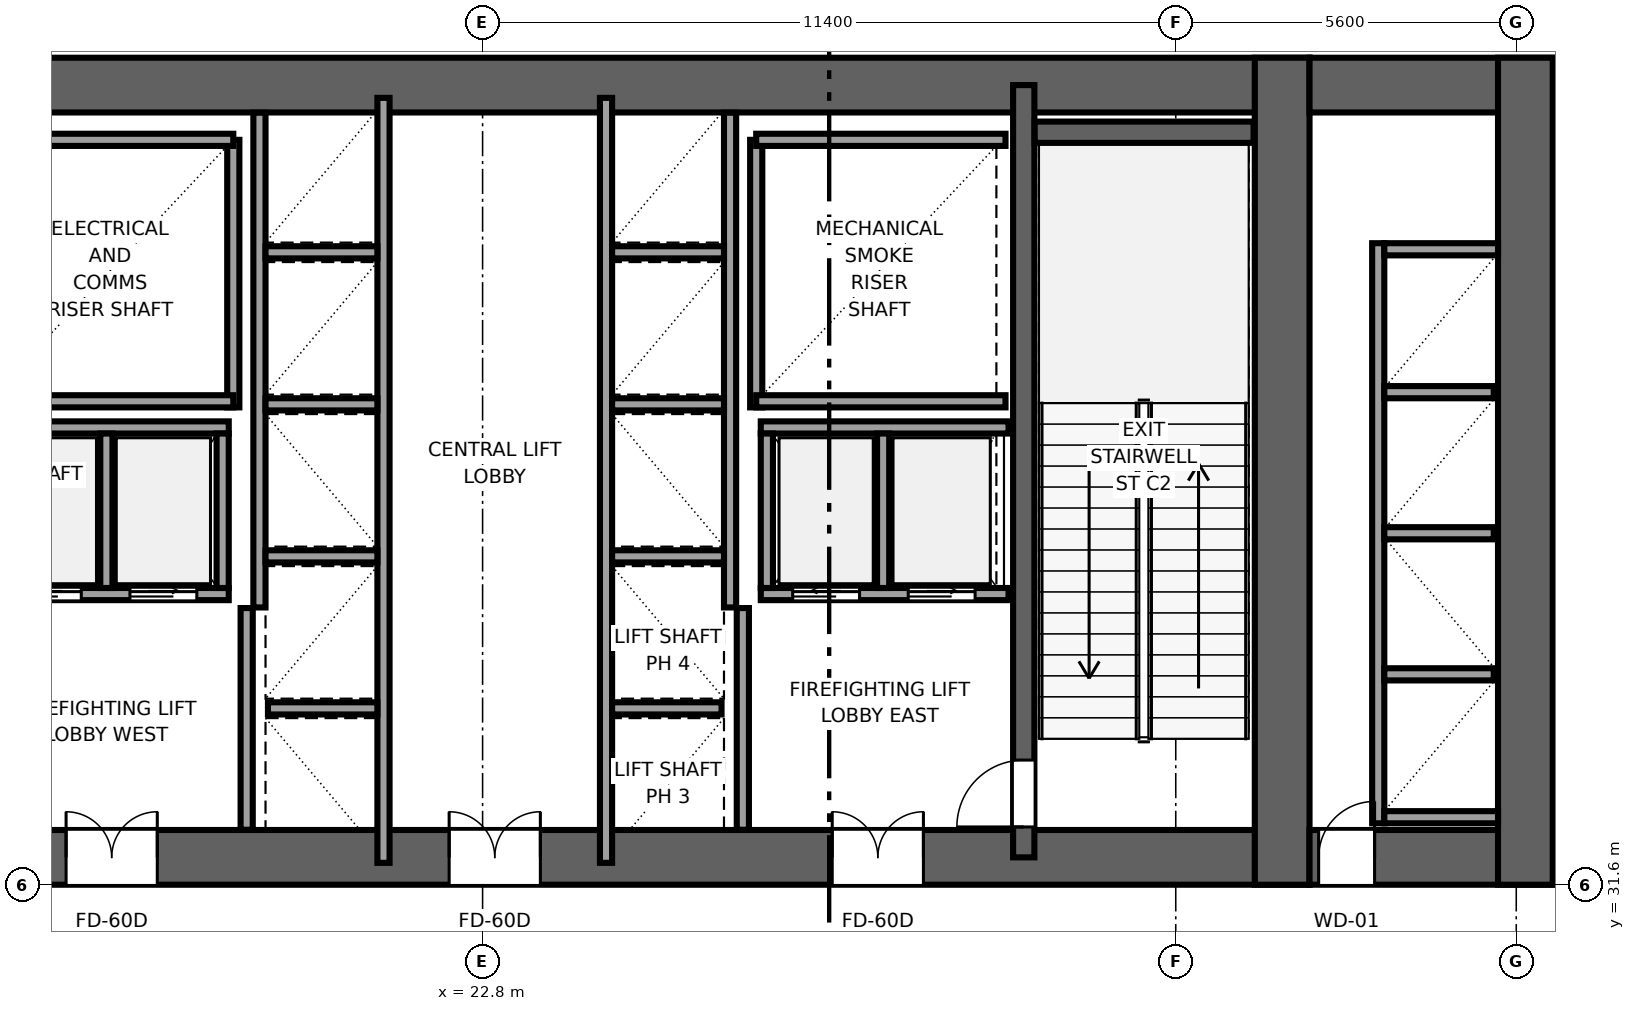
"""IFC4 building model, lengths in metres.
Left out: names, types, materials, properties, quantities, classifications, styles, units other than length and angle.
Written with IfcOpenShell. Run it as: python <this file> out.ifc"""

import sys

from ifc_helpers import new_model, si_unit, direction, frame, frame_2d, origin, place, context, subcontext, project, spatial, rectangle, extrude, source, transform, mapped, element, fill, save


model = new_model("IFC4")
c1 = context("Model", 3, precision=1e-05, world=origin(), true_north=direction((0.0, 1.0)))
c2 = subcontext(c1, "Body", "Model", "MODEL_VIEW")
j1 = project(units=[si_unit("LENGTHUNIT", "METRE"), si_unit("PLANEANGLEUNIT", "RADIAN")], contexts=[c1])
p1 = place(None, origin())
s1 = spatial("IfcSite", under=j1, at=p1, CompositionType="ELEMENT")
p2 = place(p1, origin())
s2 = spatial("IfcBuilding", under=s1, at=p2, CompositionType="ELEMENT")
p3 = place(p2, frame((0.0, 0.0, 16.0)))
s3 = spatial("IfcBuildingStorey", under=s2, at=p3, CompositionType="ELEMENT", Elevation=16.0)
p4 = place(p3, frame((9.6, 32.05, 0.0), z_axis=(0.0, 0.0, 1.0), x_axis=(1.0, 0.0, 0.0)))
e1 = element("IfcWall", 1, at=p4, inside=s3, PredefinedType="SHEAR", context=c2, shape_type="SweptSolid", body=[
    extrude(rectangle(XDim=26.8, YDim=0.9, at=frame_2d((13.4, 0.0))), origin(), (0.0, 0.0, 1.0), 6.4),
])
p5 = place(p4, frame((7.85, 0.0, 0.0), z_axis=(0.0, 0.0, 1.0), x_axis=(-1.0, 0.0, 0.0)))
e2 = element("IfcOpeningElement", 2, at=p5, cuts=e1, PredefinedType="OPENING", context=c2, shape_type="SweptSolid", body=[
    extrude(rectangle(XDim=1.5, YDim=2.04, at=frame_2d((0.75, 1.02))), frame((0.0, 0.46, 0.0), z_axis=(0.0, -1.0, 0.0), x_axis=(1.0, 0.0, 0.0)), (0.0, 0.0, 1.0), 0.92),
])
p6 = place(p4, frame((14.15, 0.0, 0.0), z_axis=(0.0, 0.0, 1.0), x_axis=(-1.0, 0.0, 0.0)))
e3 = element("IfcOpeningElement", 3, at=p6, cuts=e1, PredefinedType="OPENING", context=c2, shape_type="SweptSolid", body=[
    extrude(rectangle(XDim=1.5, YDim=2.04, at=frame_2d((0.75, 1.02))), frame((0.0, 0.46, 0.0), z_axis=(0.0, -1.0, 0.0), x_axis=(1.0, 0.0, 0.0)), (0.0, 0.0, 1.0), 0.92),
])
p7 = place(p4, frame((20.45, 0.0, 0.0), z_axis=(0.0, 0.0, 1.0), x_axis=(-1.0, 0.0, 0.0)))
e4 = element("IfcOpeningElement", 4, at=p7, cuts=e1, PredefinedType="OPENING", context=c2, shape_type="SweptSolid", body=[
    extrude(rectangle(XDim=1.5, YDim=2.04, at=frame_2d((0.75, 1.02))), frame((0.0, 0.46, 0.0), z_axis=(0.0, -1.0, 0.0), x_axis=(1.0, 0.0, 0.0)), (0.0, 0.0, 1.0), 0.92),
])
p8 = place(p3, frame((9.6, 44.75, 0.0), z_axis=(0.0, 0.0, 1.0), x_axis=(1.0, 0.0, 0.0)))
e5 = element("IfcWall", 5, at=p8, inside=s3, PredefinedType="SHEAR", context=c2, shape_type="SweptSolid", body=[
    extrude(rectangle(XDim=26.8, YDim=0.9, at=frame_2d((13.4, 0.0))), origin(), (0.0, 0.0, 1.0), 6.4),
])
p9 = place(p3, frame((35.95, 31.6, 0.0), z_axis=(0.0, 0.0, 1.0), x_axis=(0.0, 1.0, 0.0)))
e6 = element("IfcWall", 6, at=p9, inside=s3, PredefinedType="SHEAR", context=c2, shape_type="SweptSolid", body=[
    extrude(rectangle(XDim=13.6, YDim=0.9, at=frame_2d((6.8, 0.0))), origin(), (0.0, 0.0, 1.0), 6.4),
])
p10 = place(p3, frame((31.7, 32.05, 0.0), z_axis=(0.0, 0.0, 1.0), x_axis=(0.0, 1.0, 0.0)))
e7 = element("IfcWall", 7, at=p10, inside=s3, PredefinedType="SHEAR", context=c2, shape_type="SweptSolid", body=[
    extrude(rectangle(XDim=12.7, YDim=0.35, at=frame_2d((6.35, 0.0))), origin(), (0.0, 0.0, 1.0), 6.4),
])
p11 = place(p10, frame((1.6, 0.0, 0.0), z_axis=(0.0, 0.0, 1.0), x_axis=(-1.0, 0.0, 0.0)))
e8 = element("IfcOpeningElement", 8, at=p11, cuts=e7, PredefinedType="OPENING", context=c2, shape_type="SweptSolid", body=[
    extrude(rectangle(XDim=1.1, YDim=2.12, at=frame_2d((0.55, 1.06))), frame((0.0, 0.185, 0.0), z_axis=(0.0, -1.0, 0.0), x_axis=(1.0, 0.0, 0.0)), (0.0, 0.0, 1.0), 0.37),
])
p12 = place(p3, frame((36.4, 32.05, 0.0), z_axis=(0.0, 0.0, 1.0), x_axis=(1.0, 0.0, 0.0)))
e9 = element("IfcWall", 9, at=p12, inside=s3, PredefinedType="SHEAR", context=c2, shape_type="SweptSolid", body=[
    extrude(rectangle(XDim=4.0, YDim=0.9, at=frame_2d((2.0, 0.0))), origin(), (0.0, 0.0, 1.0), 6.4),
])
p13 = place(p12, frame((1.07, 0.0, 0.0), z_axis=(0.0, 0.0, 1.0), x_axis=(-1.0, 0.0, 0.0)))
e10 = element("IfcOpeningElement", 10, at=p13, cuts=e9, PredefinedType="OPENING", context=c2, shape_type="SweptSolid", body=[
    extrude(rectangle(XDim=0.92, YDim=2.01, at=frame_2d((0.46, 1.005))), frame((0.0, 0.46, 0.0), z_axis=(0.0, -1.0, 0.0), x_axis=(1.0, 0.0, 0.0)), (0.0, 0.0, 1.0), 0.92),
])
p14 = place(p3, frame((36.4, 44.75, 0.0), z_axis=(0.0, 0.0, 1.0), x_axis=(1.0, 0.0, 0.0)))
e11 = element("IfcWall", 11, at=p14, inside=s3, PredefinedType="SHEAR", context=c2, shape_type="SweptSolid", body=[
    extrude(rectangle(XDim=4.0, YDim=0.9, at=frame_2d((2.0, 0.0))), origin(), (0.0, 0.0, 1.0), 6.4),
])
p15 = place(p3, frame((39.95, 31.6, 0.0), z_axis=(0.0, 0.0, 1.0), x_axis=(0.0, 1.0, 0.0)))
e12 = element("IfcWall", 12, at=p15, inside=s3, PredefinedType="SHEAR", context=c2, shape_type="SweptSolid", body=[
    extrude(rectangle(XDim=13.6, YDim=0.9, at=frame_2d((6.8, 0.0))), origin(), (0.0, 0.0, 1.0), 6.4),
])
p16 = place(p3, frame((31.88, 43.975, 0.0), z_axis=(0.0, 0.0, 1.0), x_axis=(1.0, 0.0, 0.0)))
e13 = element("IfcWall", 13, at=p16, inside=s3, PredefinedType="SHEAR", context=c2, shape_type="SweptSolid", body=[
    extrude(rectangle(XDim=3.6, YDim=0.35, at=frame_2d((1.8, 0.0))), origin(), (0.0, 0.0, 1.0), 6.4),
])
p17 = place(p3, frame((18.7, 39.45, 0.0), z_axis=(0.0, 0.0, 1.0), x_axis=(0.0, 1.0, 0.0)))
e14 = element("IfcWall", 14, at=p17, inside=s3, PredefinedType="SOLIDWALL", context=c2, shape_type="SweptSolid", body=[
    extrude(rectangle(XDim=4.4, YDim=0.2, at=frame_2d((2.2, 0.0))), origin(), (0.0, 0.0, 1.0), 6.14),
])
for number, where, z_axis, x_axis in (
    (15, (14.6, 39.55, 0.0), (0.0, 0.0, 1.0), (1.0, 0.0, 0.0)),
    (16, (14.6, 43.85, 0.0), (0.0, 0.0, 1.0), (1.0, 0.0, 0.0)),
):
    element("IfcWall", number, at=place(p3, frame(where, z_axis=z_axis, x_axis=x_axis)), inside=s3, PredefinedType="SOLIDWALL", context=c2, shape_type="SweptSolid", body=[
        extrude(rectangle(XDim=4.1, YDim=0.2, at=frame_2d((2.05, 0.0))), origin(), (0.0, 0.0, 1.0), 6.14),
    ])
p18 = place(p3, frame((27.3, 39.45, 0.0), z_axis=(0.0, 0.0, 1.0), x_axis=(0.0, 1.0, 0.0)))
e17 = element("IfcWall", 17, at=p18, inside=s3, PredefinedType="SOLIDWALL", context=c2, shape_type="SweptSolid", body=[
    extrude(rectangle(XDim=4.4, YDim=0.2, at=frame_2d((2.2, 0.0))), origin(), (0.0, 0.0, 1.0), 6.14),
])
for number, where, z_axis, x_axis in (
    (18, (27.3, 39.55, 0.0), (0.0, 0.0, 1.0), (1.0, 0.0, 0.0)),
    (19, (27.3, 43.85, 0.0), (0.0, 0.0, 1.0), (1.0, 0.0, 0.0)),
):
    element("IfcWall", number, at=place(p3, frame(where, z_axis=z_axis, x_axis=x_axis)), inside=s3, PredefinedType="SOLIDWALL", context=c2, shape_type="SweptSolid", body=[
        extrude(rectangle(XDim=4.1, YDim=0.2, at=frame_2d((2.05, 0.0))), origin(), (0.0, 0.0, 1.0), 6.14),
    ])
for number, where, z_axis, x_axis in (
    (20, (18.92, 32.504, 0.0), (0.0, 0.0, 1.0), (0.0, 1.0, 0.0)),
    (21, (27.08, 32.504, 0.0), (0.0, 0.0, 1.0), (0.0, 1.0, 0.0)),
):
    element("IfcWall", number, at=place(p3, frame(where, z_axis=z_axis, x_axis=x_axis)), inside=s3, PredefinedType="SOLIDWALL", context=c2, shape_type="SweptSolid", body=[
        extrude(rectangle(XDim=3.646, YDim=0.2, at=frame_2d((1.823, 0.0))), origin(), (0.0, 0.0, 1.0), 6.14),
    ])
p19 = place(p3, frame((21.17, 31.96, 0.0), z_axis=(0.0, 0.0, 1.0), x_axis=(0.0, 1.0, 0.0)))
e22 = element("IfcWall", 22, at=p19, inside=s3, PredefinedType="SOLIDWALL", context=c2, shape_type="SweptSolid", body=[
    extrude(rectangle(XDim=12.58, YDim=0.2, at=frame_2d((6.29, 0.0))), origin(), (0.0, 0.0, 1.0), 6.14),
])
p20 = place(p3, frame((19.13, 36.16, 0.0), z_axis=(0.0, 0.0, 1.0), x_axis=(0.0, 1.0, 0.0)))
e23 = element("IfcWall", 23, at=p20, inside=s3, PredefinedType="SOLIDWALL", context=c2, shape_type="SweptSolid", body=[
    extrude(rectangle(XDim=8.136, YDim=0.2, at=frame_2d((4.068, 0.0))), origin(), (0.0, 0.0, 1.0), 6.14),
])
p21 = place(p3, frame((19.27, 34.5, 0.0), z_axis=(0.0, 0.0, 1.0), x_axis=(1.0, 0.0, 0.0)))
e24 = element("IfcWall", 24, at=p21, inside=s3, PredefinedType="SOLIDWALL", context=c2, shape_type="SweptSolid", body=[
    extrude(rectangle(XDim=1.8, YDim=0.2, at=frame_2d((0.9, 0.0))), origin(), (0.0, 0.0, 1.0), 6.14),
])
for number, where, z_axis, x_axis in (
    (25, (19.23, 37.0, 0.0), (0.0, 0.0, 1.0), (1.0, 0.0, 0.0)),
    (26, (19.23, 39.5, 0.0), (0.0, 0.0, 1.0), (1.0, 0.0, 0.0)),
    (27, (19.23, 42.0, 0.0), (0.0, 0.0, 1.0), (1.0, 0.0, 0.0)),
):
    element("IfcWall", number, at=place(p3, frame(where, z_axis=z_axis, x_axis=x_axis)), inside=s3, PredefinedType="SOLIDWALL", context=c2, shape_type="SweptSolid", body=[
        extrude(rectangle(XDim=1.84, YDim=0.2, at=frame_2d((0.92, 0.0))), origin(), (0.0, 0.0, 1.0), 6.14),
    ])
p22 = place(p3, frame((27.375, 36.38, 0.0), z_axis=(0.0, 0.0, 1.0), x_axis=(1.0, 0.0, 0.0)))
e28 = element("IfcWall", 28, at=p22, inside=s3, PredefinedType="SOLIDWALL", context=c2, shape_type="SweptSolid", body=[
    extrude(rectangle(XDim=4.075, YDim=0.2, at=frame_2d((2.038, 0.0))), origin(), (0.0, 0.0, 1.0), 6.14),
])
p23 = place(p22, frame((0.525, 0.0, 0.0)))
e29 = element("IfcOpeningElement", 29, at=p23, cuts=e28, PredefinedType="OPENING", context=c2, shape_type="SweptSolid", body=[
    extrude(rectangle(XDim=1.1, YDim=2.12, at=frame_2d((0.55, 1.06))), frame((0.0, 0.11, 0.0), z_axis=(0.0, -1.0, 0.0), x_axis=(1.0, 0.0, 0.0)), (0.0, 0.0, 1.0), 0.22),
])
p24 = place(p22, frame((2.425, 0.0, 0.0)))
e30 = element("IfcOpeningElement", 30, at=p24, cuts=e28, PredefinedType="OPENING", context=c2, shape_type="SweptSolid", body=[
    extrude(rectangle(XDim=1.1, YDim=2.12, at=frame_2d((0.55, 1.06))), frame((0.0, 0.11, 0.0), z_axis=(0.0, -1.0, 0.0), x_axis=(1.0, 0.0, 0.0)), (0.0, 0.0, 1.0), 0.22),
])
p25 = place(p3, frame((27.375, 39.12, 0.0), z_axis=(0.0, 0.0, 1.0), x_axis=(1.0, 0.0, 0.0)))
e31 = element("IfcWall", 31, at=p25, inside=s3, PredefinedType="SOLIDWALL", context=c2, shape_type="SweptSolid", body=[
    extrude(rectangle(XDim=4.075, YDim=0.2, at=frame_2d((2.038, 0.0))), origin(), (0.0, 0.0, 1.0), 6.14),
])
for number, where, z_axis, x_axis in (
    (32, (27.475, 36.48, 0.0), (0.0, 0.0, 1.0), (0.0, 1.0, 0.0)),
    (33, (29.387, 36.48, 0.0), (0.0, 0.0, 1.0), (0.0, 1.0, 0.0)),
):
    element("IfcWall", number, at=place(p3, frame(where, z_axis=z_axis, x_axis=x_axis)), inside=s3, PredefinedType="SOLIDWALL", context=c2, shape_type="SweptSolid", body=[
        extrude(rectangle(XDim=2.54, YDim=0.2, at=frame_2d((1.27, 0.0))), origin(), (0.0, 0.0, 1.0), 6.14),
    ])
p26 = place(p3, frame((14.55, 36.38, 0.0), z_axis=(0.0, 0.0, 1.0), x_axis=(1.0, 0.0, 0.0)))
e34 = element("IfcWall", 34, at=p26, inside=s3, PredefinedType="SOLIDWALL", context=c2, shape_type="SweptSolid", body=[
    extrude(rectangle(XDim=4.075, YDim=0.2, at=frame_2d((2.038, 0.0))), origin(), (0.0, 0.0, 1.0), 6.14),
])
p27 = place(p26, frame((0.55, 0.0, 0.0)))
e35 = element("IfcOpeningElement", 35, at=p27, cuts=e34, PredefinedType="OPENING", context=c2, shape_type="SweptSolid", body=[
    extrude(rectangle(XDim=1.1, YDim=2.12, at=frame_2d((0.55, 1.06))), frame((0.0, 0.11, 0.0), z_axis=(0.0, -1.0, 0.0), x_axis=(1.0, 0.0, 0.0)), (0.0, 0.0, 1.0), 0.22),
])
p28 = place(p26, frame((2.45, 0.0, 0.0)))
e36 = element("IfcOpeningElement", 36, at=p28, cuts=e34, PredefinedType="OPENING", context=c2, shape_type="SweptSolid", body=[
    extrude(rectangle(XDim=1.1, YDim=2.12, at=frame_2d((0.55, 1.06))), frame((0.0, 0.11, 0.0), z_axis=(0.0, -1.0, 0.0), x_axis=(1.0, 0.0, 0.0)), (0.0, 0.0, 1.0), 0.22),
])
p29 = place(p3, frame((14.55, 39.12, 0.0), z_axis=(0.0, 0.0, 1.0), x_axis=(1.0, 0.0, 0.0)))
e37 = element("IfcWall", 37, at=p29, inside=s3, PredefinedType="SOLIDWALL", context=c2, shape_type="SweptSolid", body=[
    extrude(rectangle(XDim=4.075, YDim=0.2, at=frame_2d((2.038, 0.0))), origin(), (0.0, 0.0, 1.0), 6.14),
])
for number, where, z_axis, x_axis in (
    (38, (18.525, 36.48, 0.0), (0.0, 0.0, 1.0), (0.0, 1.0, 0.0)),
    (39, (16.613, 36.48, 0.0), (0.0, 0.0, 1.0), (0.0, 1.0, 0.0)),
):
    element("IfcWall", number, at=place(p3, frame(where, z_axis=z_axis, x_axis=x_axis)), inside=s3, PredefinedType="SOLIDWALL", context=c2, shape_type="SweptSolid", body=[
        extrude(rectangle(XDim=2.54, YDim=0.2, at=frame_2d((1.27, 0.0))), origin(), (0.0, 0.0, 1.0), 6.14),
    ])
p30 = place(p3, frame((24.83, 31.96, 0.0), z_axis=(0.0, 0.0, 1.0), x_axis=(0.0, 1.0, 0.0)))
e40 = element("IfcWall", 40, at=p30, inside=s3, PredefinedType="SOLIDWALL", context=c2, shape_type="SweptSolid", body=[
    extrude(rectangle(XDim=12.58, YDim=0.2, at=frame_2d((6.29, 0.0))), origin(), (0.0, 0.0, 1.0), 6.14),
])
p31 = place(p3, frame((26.87, 36.16, 0.0), z_axis=(0.0, 0.0, 1.0), x_axis=(0.0, 1.0, 0.0)))
e41 = element("IfcWall", 41, at=p31, inside=s3, PredefinedType="SOLIDWALL", context=c2, shape_type="SweptSolid", body=[
    extrude(rectangle(XDim=8.136, YDim=0.2, at=frame_2d((4.068, 0.0))), origin(), (0.0, 0.0, 1.0), 6.14),
])
p32 = place(p3, frame((24.93, 34.5, 0.0), z_axis=(0.0, 0.0, 1.0), x_axis=(1.0, 0.0, 0.0)))
e42 = element("IfcWall", 42, at=p32, inside=s3, PredefinedType="SOLIDWALL", context=c2, shape_type="SweptSolid", body=[
    extrude(rectangle(XDim=1.8, YDim=0.2, at=frame_2d((0.9, 0.0))), origin(), (0.0, 0.0, 1.0), 6.14),
])
for number, where, z_axis, x_axis in (
    (43, (24.93, 37.0, 0.0), (0.0, 0.0, 1.0), (1.0, 0.0, 0.0)),
    (44, (24.93, 39.5, 0.0), (0.0, 0.0, 1.0), (1.0, 0.0, 0.0)),
    (45, (24.93, 42.0, 0.0), (0.0, 0.0, 1.0), (1.0, 0.0, 0.0)),
):
    element("IfcWall", number, at=place(p3, frame(where, z_axis=z_axis, x_axis=x_axis)), inside=s3, PredefinedType="SOLIDWALL", context=c2, shape_type="SweptSolid", body=[
        extrude(rectangle(XDim=1.84, YDim=0.2, at=frame_2d((0.92, 0.0))), origin(), (0.0, 0.0, 1.0), 6.14),
    ])
p33 = place(p3, frame((37.53, 32.61, 0.0), z_axis=(0.0, 0.0, 1.0), x_axis=(0.0, 1.0, 0.0)))
e46 = element("IfcWall", 46, at=p33, inside=s3, PredefinedType="SOLIDWALL", context=c2, shape_type="SweptSolid", body=[
    extrude(rectangle(XDim=9.54, YDim=0.2, at=frame_2d((4.77, 0.0))), origin(), (0.0, 0.0, 1.0), 6.14),
])
for number, where, z_axis, x_axis in (
    (47, (37.63, 32.71, 0.0), (0.0, 0.0, 1.0), (1.0, 0.0, 0.0)),
    (48, (37.63, 42.05, 0.0), (0.0, 0.0, 1.0), (1.0, 0.0, 0.0)),
):
    element("IfcWall", number, at=place(p3, frame(where, z_axis=z_axis, x_axis=x_axis)), inside=s3, PredefinedType="SOLIDWALL", context=c2, shape_type="SweptSolid", body=[
        extrude(rectangle(XDim=1.87, YDim=0.2, at=frame_2d((0.935, 0.0))), origin(), (0.0, 0.0, 1.0), 6.14),
    ])
for number, where, z_axis, x_axis in (
    (49, (37.63, 35.06, 0.0), (0.0, 0.0, 1.0), (1.0, 0.0, 0.0)),
    (50, (37.63, 37.38, 0.0), (0.0, 0.0, 1.0), (1.0, 0.0, 0.0)),
    (51, (37.63, 39.7, 0.0), (0.0, 0.0, 1.0), (1.0, 0.0, 0.0)),
):
    element("IfcWall", number, at=place(p3, frame(where, z_axis=z_axis, x_axis=x_axis)), inside=s3, PredefinedType="SOLIDWALL", context=c2, shape_type="SweptSolid", body=[
        extrude(rectangle(XDim=1.8, YDim=0.2, at=frame_2d((0.9, 0.0))), origin(), (0.0, 0.0, 1.0), 6.14),
    ])
m1 = source(origin(), c2, "Body", "SweptSolid", [
    extrude(rectangle(XDim=1.1, YDim=2.12, at=frame_2d((0.55, 1.06))), frame((0.0, 0.025, 0.0), z_axis=(0.0, -1.0, 0.0), x_axis=(1.0, 0.0, 0.0)), (0.0, 0.0, 1.0), 0.05),
])
p34 = place(p11, origin())
e52 = element("IfcDoor", 52, at=p34, inside=s3, OperationType="SINGLE_SWING_LEFT", PredefinedType="DOOR", context=c2, shape_type="MappedRepresentation", body=[
    mapped(m1, transform((0.0, 0.0, 0.0), x_axis=(1.0, 0.0, 0.0), y_axis=(0.0, 1.0, 0.0), z_axis=(0.0, 0.0, 1.0), scale=1.0)),
])
fill(e8, e52)
m2 = source(origin(), c2, "Body", "SweptSolid", [
    extrude(rectangle(XDim=1.5, YDim=2.04, at=frame_2d((0.75, 1.02))), frame((0.0, 0.025, 0.0), z_axis=(0.0, -1.0, 0.0), x_axis=(1.0, 0.0, 0.0)), (0.0, 0.0, 1.0), 0.05),
])
p35 = place(p5, origin())
e53 = element("IfcDoor", 53, at=p35, inside=s3, OperationType="DOUBLE_DOOR_SINGLE_SWING", PredefinedType="DOOR", context=c2, shape_type="MappedRepresentation", body=[
    mapped(m2, transform((0.0, 0.0, 0.0), x_axis=(1.0, 0.0, 0.0), y_axis=(0.0, 1.0, 0.0), z_axis=(0.0, 0.0, 1.0), scale=1.0)),
])
fill(e2, e53)
p36 = place(p6, origin())
e54 = element("IfcDoor", 54, at=p36, inside=s3, OperationType="DOUBLE_DOOR_SINGLE_SWING", PredefinedType="DOOR", context=c2, shape_type="MappedRepresentation", body=[
    mapped(m2, transform((0.0, 0.0, 0.0), x_axis=(1.0, 0.0, 0.0), y_axis=(0.0, 1.0, 0.0), z_axis=(0.0, 0.0, 1.0), scale=1.0)),
])
fill(e3, e54)
p37 = place(p7, origin())
e55 = element("IfcDoor", 55, at=p37, inside=s3, OperationType="DOUBLE_DOOR_SINGLE_SWING", PredefinedType="DOOR", context=c2, shape_type="MappedRepresentation", body=[
    mapped(m2, transform((0.0, 0.0, 0.0), x_axis=(1.0, 0.0, 0.0), y_axis=(0.0, 1.0, 0.0), z_axis=(0.0, 0.0, 1.0), scale=1.0)),
])
fill(e4, e55)
m3 = source(origin(), c2, "Body", "SweptSolid", [
    extrude(rectangle(XDim=0.92, YDim=2.01, at=frame_2d((0.46, 1.005))), frame((0.0, 0.025, 0.0), z_axis=(0.0, -1.0, 0.0), x_axis=(1.0, 0.0, 0.0)), (0.0, 0.0, 1.0), 0.05),
])
p38 = place(p13, origin())
e56 = element("IfcDoor", 56, at=p38, inside=s3, OperationType="SINGLE_SWING_RIGHT", PredefinedType="DOOR", context=c2, shape_type="MappedRepresentation", body=[
    mapped(m3, transform((0.0, 0.0, 0.0), x_axis=(1.0, 0.0, 0.0), y_axis=(0.0, 1.0, 0.0), z_axis=(0.0, 0.0, 1.0), scale=1.0)),
])
fill(e10, e56)
m4 = source(origin(), c2, "Body", "SweptSolid", [
    extrude(rectangle(XDim=1.1, YDim=2.12, at=frame_2d((0.55, 1.06))), frame((0.0, 0.025, 0.0), z_axis=(0.0, -1.0, 0.0), x_axis=(1.0, 0.0, 0.0)), (0.0, 0.0, 1.0), 0.05),
])
p39 = place(p23, origin())
e57 = element("IfcDoor", 57, at=p39, inside=s3, OperationType="SLIDING_TO_LEFT", PredefinedType="DOOR", context=c2, shape_type="MappedRepresentation", body=[
    mapped(m4, transform((0.0, 0.0, 0.0), x_axis=(1.0, 0.0, 0.0), y_axis=(0.0, 1.0, 0.0), z_axis=(0.0, 0.0, 1.0), scale=1.0)),
])
fill(e29, e57)
p40 = place(p24, origin())
e58 = element("IfcDoor", 58, at=p40, inside=s3, OperationType="SLIDING_TO_RIGHT", PredefinedType="DOOR", context=c2, shape_type="MappedRepresentation", body=[
    mapped(m4, transform((0.0, 0.0, 0.0), x_axis=(1.0, 0.0, 0.0), y_axis=(0.0, 1.0, 0.0), z_axis=(0.0, 0.0, 1.0), scale=1.0)),
])
fill(e30, e58)
p41 = place(p27, origin())
e59 = element("IfcDoor", 59, at=p41, inside=s3, OperationType="SLIDING_TO_LEFT", PredefinedType="DOOR", context=c2, shape_type="MappedRepresentation", body=[
    mapped(m4, transform((0.0, 0.0, 0.0), x_axis=(1.0, 0.0, 0.0), y_axis=(0.0, 1.0, 0.0), z_axis=(0.0, 0.0, 1.0), scale=1.0)),
])
fill(e35, e59)
p42 = place(p28, origin())
e60 = element("IfcDoor", 60, at=p42, inside=s3, OperationType="SLIDING_TO_RIGHT", PredefinedType="DOOR", context=c2, shape_type="MappedRepresentation", body=[
    mapped(m4, transform((0.0, 0.0, 0.0), x_axis=(1.0, 0.0, 0.0), y_axis=(0.0, 1.0, 0.0), z_axis=(0.0, 0.0, 1.0), scale=1.0)),
])
fill(e36, e60)
save(model, sys.argv[1])
